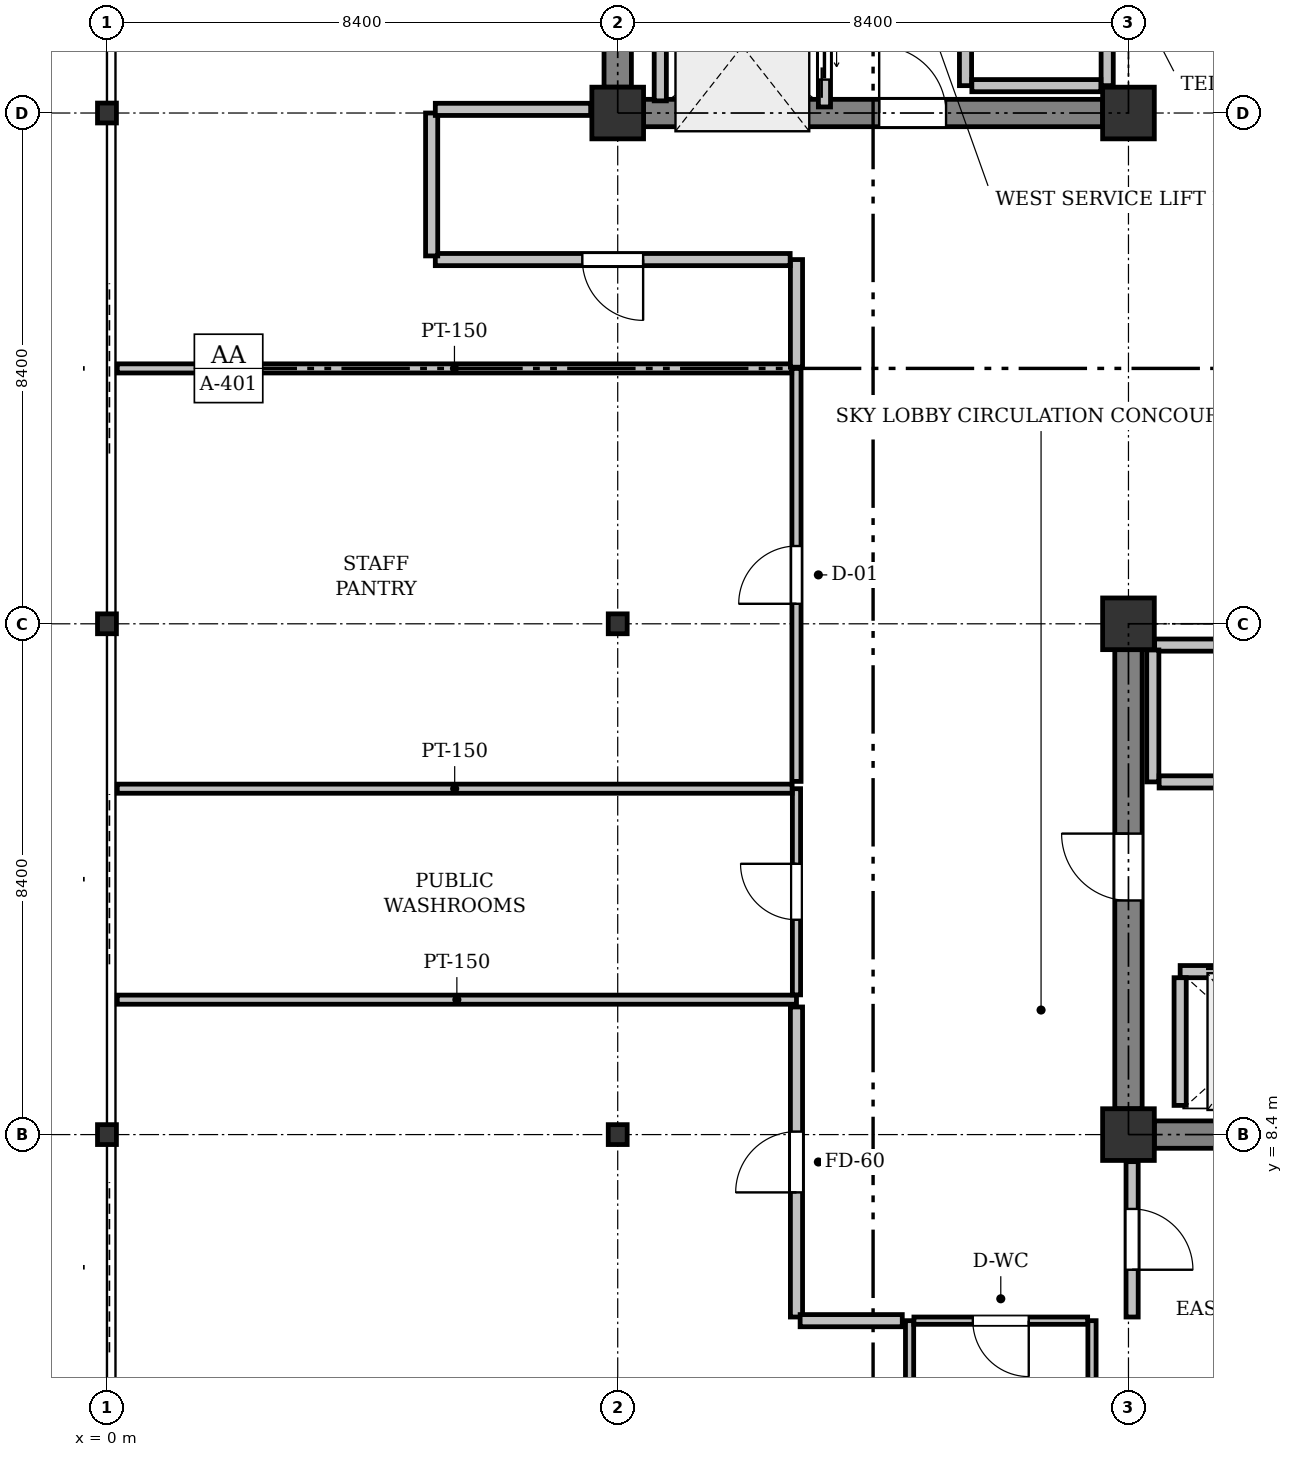
"""IFC4 building model, lengths in metres.
Left out: names, types, materials, properties, quantities, classifications, styles, units other than length and angle.
Written with IfcOpenShell. Run it as: python <this file> out.ifc"""

import sys

from ifc_helpers import new_model, si_unit, direction, frame, frame_2d, origin, origin_2d, place, context, subcontext, project, spatial, rectangle, i_section, extrude, element, fill, save


model = new_model("IFC4")
c1 = context("Model", 3, precision=1e-05, world=origin(), true_north=direction((0.0, 1.0)))
c2 = subcontext(c1, "Body", "Model", "MODEL_VIEW")
j1 = project(units=[si_unit("LENGTHUNIT", "METRE"), si_unit("PLANEANGLEUNIT", "RADIAN")], contexts=[c1])
p1 = place(None, origin())
s1 = spatial("IfcSite", under=j1, at=p1, CompositionType="ELEMENT")
p2 = place(p1, origin())
s2 = spatial("IfcBuilding", under=s1, at=p2, CompositionType="ELEMENT")
p3 = place(p2, frame((0.0, 0.0, 286.2)))
s3 = spatial("IfcBuildingStorey", under=s2, at=p3, CompositionType="ELEMENT", Elevation=286.2)
for number, where, z_axis, x_axis in (
    (1, (0.0, 8.4, 0.0), (0.0, 0.0, 1.0), (1.0, 0.0, 0.0)),
    (2, (0.0, 16.8, 0.0), (0.0, 0.0, 1.0), (1.0, 0.0, 0.0)),
    (3, (0.0, 25.2, 0.0), (0.0, 0.0, 1.0), (1.0, 0.0, 0.0)),
    (4, (8.4, 8.4, 0.0), (0.0, 0.0, 1.0), (1.0, 0.0, 0.0)),
    (5, (8.4, 16.8, 0.0), (0.0, 0.0, 1.0), (1.0, 0.0, 0.0)),
):
    element("IfcColumn", number, at=place(p3, frame(where, z_axis=z_axis, x_axis=x_axis)), inside=s3, PredefinedType="COLUMN", context=c2, shape_type="SweptSolid", body=[
        extrude(i_section(OverallWidth=0.311, OverallDepth=0.327, WebThickness=0.016, FlangeThickness=0.025, FilletRadius=0.017, at=origin_2d()), origin(), (0.0, 0.0, 1.0), 4.0),
    ])
for number, where, z_axis, x_axis in (
    (6, (8.4, 25.2, 0.0), (0.0, 0.0, 1.0), (1.0, 0.0, 0.0)),
    (7, (16.8, 8.4, 0.0), (0.0, 0.0, 1.0), (1.0, 0.0, 0.0)),
    (8, (16.8, 16.8, 0.0), (0.0, 0.0, 1.0), (1.0, 0.0, 0.0)),
    (9, (16.8, 25.2, 0.0), (0.0, 0.0, 1.0), (1.0, 0.0, 0.0)),
):
    element("IfcColumn", number, at=place(p3, frame(where, z_axis=z_axis, x_axis=x_axis)), inside=s3, PredefinedType="COLUMN", context=c2, shape_type="SweptSolid", body=[
        extrude(rectangle(XDim=0.85, YDim=0.85, at=origin_2d()), origin(), (0.0, 0.0, 1.0), 4.0),
    ])
p4 = place(p3, frame((8.4, 25.625, 0.0), z_axis=(0.0, 0.0, 1.0), x_axis=(0.0, 1.0, 0.0)))
e10 = element("IfcWall", 10, at=p4, inside=s3, PredefinedType="SHEAR", context=c2, shape_type="SweptSolid", body=[
    extrude(rectangle(XDim=7.55, YDim=0.45, at=frame_2d((3.775, 0.0))), origin(), (0.0, 0.0, 1.0), 3.725),
])
p5 = place(p3, frame((8.825, 25.2, 0.0), z_axis=(0.0, 0.0, 1.0), x_axis=(1.0, 0.0, 0.0)))
e11 = element("IfcWall", 11, at=p5, inside=s3, PredefinedType="SHEAR", context=c2, shape_type="SweptSolid", body=[
    extrude(rectangle(XDim=7.55, YDim=0.45, at=frame_2d((3.775, 0.0))), origin(), (0.0, 0.0, 1.0), 3.725),
])
p6 = place(p5, frame((3.875, 0.0, 0.0)))
e12 = element("IfcOpeningElement", 12, at=p6, cuts=e11, PredefinedType="OPENING", context=c2, shape_type="SweptSolid", body=[
    extrude(rectangle(XDim=1.1, YDim=2.15, at=frame_2d((0.55, 1.075))), frame((0.0, 0.235, 0.0), z_axis=(0.0, -1.0, 0.0), x_axis=(1.0, 0.0, 0.0)), (0.0, 0.0, 1.0), 0.47),
])
p7 = place(p3, frame((17.225, 8.4, 0.0), z_axis=(0.0, 0.0, 1.0), x_axis=(1.0, 0.0, 0.0)))
e13 = element("IfcWall", 13, at=p7, inside=s3, PredefinedType="SHEAR", context=c2, shape_type="SweptSolid", body=[
    extrude(rectangle(XDim=7.55, YDim=0.45, at=frame_2d((3.775, 0.0))), origin(), (0.0, 0.0, 1.0), 3.725),
])
p8 = place(p3, frame((16.8, 8.825, 0.0), z_axis=(0.0, 0.0, 1.0), x_axis=(0.0, 1.0, 0.0)))
e14 = element("IfcWall", 14, at=p8, inside=s3, PredefinedType="SHEAR", context=c2, shape_type="SweptSolid", body=[
    extrude(rectangle(XDim=7.55, YDim=0.45, at=frame_2d((3.775, 0.0))), origin(), (0.0, 0.0, 1.0), 3.725),
])
p9 = place(p8, frame((3.425, 0.0, 0.0)))
e15 = element("IfcOpeningElement", 15, at=p9, cuts=e14, PredefinedType="OPENING", context=c2, shape_type="SweptSolid", body=[
    extrude(rectangle(XDim=1.1, YDim=2.15, at=frame_2d((0.55, 1.075))), frame((0.0, 0.235, 0.0), z_axis=(0.0, -1.0, 0.0), x_axis=(1.0, 0.0, 0.0)), (0.0, 0.0, 1.0), 0.47),
])
p10 = place(p3, frame((11.8, 25.3, 0.0), z_axis=(0.0, 0.0, 1.0), x_axis=(0.0, 1.0, 0.0)))
e16 = element("IfcWall", 16, at=p10, inside=s3, PredefinedType="PARTITIONING", context=c2, shape_type="SweptSolid", body=[
    extrude(rectangle(XDim=2.0, YDim=0.2, at=frame_2d((1.0, 0.0))), origin(), (0.0, 0.0, 1.0), 3.725),
])
p11 = place(p10, frame((0.45, 0.0, 0.0)))
e17 = element("IfcOpeningElement", 17, at=p11, cuts=e16, PredefinedType="OPENING", context=c2, shape_type="SweptSolid", body=[
    extrude(rectangle(XDim=1.1, YDim=2.2, at=frame_2d((0.55, 1.1))), frame((0.0, 0.11, 0.0), z_axis=(0.0, -1.0, 0.0), x_axis=(1.0, 0.0, 0.0)), (0.0, 0.0, 1.0), 0.22),
])
p12 = place(p3, frame((9.1, 25.4, 0.0), z_axis=(0.0, 0.0, 1.0), x_axis=(0.0, 1.0, 0.0)))
e18 = element("IfcWall", 18, at=p12, inside=s3, PredefinedType="PARTITIONING", context=c2, shape_type="SweptSolid", body=[
    extrude(rectangle(XDim=1.8, YDim=0.2, at=frame_2d((0.9, 0.0))), origin(), (0.0, 0.0, 1.0), 3.725),
])
p13 = place(p3, frame((17.65, 11.08, 0.0), z_axis=(0.0, 0.0, 1.0), x_axis=(1.0, 0.0, 0.0)))
e19 = element("IfcWall", 19, at=p13, inside=s3, PredefinedType="PARTITIONING", context=c2, shape_type="SweptSolid", body=[
    extrude(rectangle(XDim=2.55, YDim=0.2, at=frame_2d((1.275, 0.0))), origin(), (0.0, 0.0, 1.0), 3.725),
])
p14 = place(p13, frame((0.725, 0.0, 0.0)))
e20 = element("IfcOpeningElement", 20, at=p14, cuts=e19, PredefinedType="OPENING", context=c2, shape_type="SweptSolid", body=[
    extrude(rectangle(XDim=1.1, YDim=2.2, at=frame_2d((0.55, 1.1))), frame((0.0, 0.11, 0.0), z_axis=(0.0, -1.0, 0.0), x_axis=(1.0, 0.0, 0.0)), (0.0, 0.0, 1.0), 0.22),
])
p15 = place(p3, frame((17.65, 8.88, 0.0), z_axis=(0.0, 0.0, 1.0), x_axis=(0.0, 1.0, 0.0)))
e21 = element("IfcWall", 21, at=p15, inside=s3, PredefinedType="PARTITIONING", context=c2, shape_type="SweptSolid", body=[
    extrude(rectangle(XDim=2.1, YDim=0.2, at=frame_2d((1.05, 0.0))), origin(), (0.0, 0.0, 1.0), 3.725),
])
p16 = place(p3, frame((16.45, 25.65, 0.0), z_axis=(0.0, 0.0, 1.0), x_axis=(0.0, 1.0, 0.0)))
e22 = element("IfcWall", 22, at=p16, inside=s3, PredefinedType="PARTITIONING", context=c2, shape_type="SweptSolid", body=[
    extrude(rectangle(XDim=7.52, YDim=0.2, at=frame_2d((3.76, 0.0))), origin(), (0.0, 0.0, 1.0), 3.725),
])
p17 = place(p3, frame((14.12, 31.336, 0.0), z_axis=(0.0, 0.0, 1.0), x_axis=(0.0, -1.0, 0.0)))
e23 = element("IfcWall", 23, at=p17, inside=s3, PredefinedType="PARTITIONING", context=c2, shape_type="SweptSolid", body=[
    extrude(rectangle(XDim=5.686, YDim=0.2, at=frame_2d((2.843, 0.0))), origin(), (0.0, 0.0, 1.0), 3.725),
])
p18 = place(p17, frame((2.418, 0.0, 0.0)))
e24 = element("IfcOpeningElement", 24, at=p18, cuts=e23, PredefinedType="OPENING", context=c2, shape_type="SweptSolid", body=[
    extrude(rectangle(XDim=0.85, YDim=2.15, at=frame_2d((0.425, 1.075))), frame((0.0, 0.11, 0.0), z_axis=(0.0, -1.0, 0.0), x_axis=(1.0, 0.0, 0.0)), (0.0, 0.0, 1.0), 0.22),
])
p19 = place(p3, frame((14.224, 25.65, 0.0), z_axis=(0.0, 0.0, 1.0), x_axis=(1.0, 0.0, 0.0)))
e25 = element("IfcWall", 25, at=p19, inside=s3, PredefinedType="PARTITIONING", context=c2, shape_type="SweptSolid", body=[
    extrude(rectangle(XDim=2.122, YDim=0.2, at=frame_2d((1.061, 0.0))), origin(), (0.0, 0.0, 1.0), 3.725),
])
p20 = place(p3, frame((24.77, 16.45, 0.0), z_axis=(0.0, 0.0, 1.0), x_axis=(-1.0, 0.0, 0.0)))
e26 = element("IfcWall", 26, at=p20, inside=s3, PredefinedType="PARTITIONING", context=c2, shape_type="SweptSolid", body=[
    extrude(rectangle(XDim=7.54, YDim=0.2, at=frame_2d((3.77, 0.0))), origin(), (0.0, 0.0, 1.0), 3.725),
])
p21 = place(p3, frame((17.2, 16.37, 0.0), z_axis=(0.0, 0.0, 1.0), x_axis=(0.0, -1.0, 0.0)))
e27 = element("IfcWall", 27, at=p21, inside=s3, PredefinedType="PARTITIONING", context=c2, shape_type="SweptSolid", body=[
    extrude(rectangle(XDim=2.17, YDim=0.2, at=frame_2d((1.085, 0.0))), origin(), (0.0, 0.0, 1.0), 3.725),
])
p22 = place(p3, frame((17.304, 14.2, 0.0), z_axis=(0.0, 0.0, 1.0), x_axis=(1.0, 0.0, 0.0)))
e28 = element("IfcWall", 28, at=p22, inside=s3, PredefinedType="PARTITIONING", context=c2, shape_type="SweptSolid", body=[
    extrude(rectangle(XDim=7.546, YDim=0.2, at=frame_2d((3.773, 0.0))), origin(), (0.0, 0.0, 1.0), 3.725),
])
p23 = place(p22, frame((3.348, 0.0, 0.0)))
e29 = element("IfcOpeningElement", 29, at=p23, cuts=e28, PredefinedType="OPENING", context=c2, shape_type="SweptSolid", body=[
    extrude(rectangle(XDim=0.85, YDim=2.15, at=frame_2d((0.425, 1.075))), frame((0.0, 0.11, 0.0), z_axis=(0.0, -1.0, 0.0), x_axis=(1.0, 0.0, 0.0)), (0.0, 0.0, 1.0), 0.22),
])
for number, where, z_axis, x_axis in (
    (30, (13.2, 5.34, 0.0), (0.0, 0.0, 1.0), (0.0, -1.0, 0.0)),
    (31, (16.2, 0.124, 0.0), (0.0, 0.0, 1.0), (0.0, 1.0, 0.0)),
):
    element("IfcWall", number, at=place(p3, frame(where, z_axis=z_axis, x_axis=x_axis)), inside=s3, PredefinedType="PARTITIONING", context=c2, shape_type="SweptSolid", body=[
        extrude(rectangle(XDim=5.216, YDim=0.135, at=frame_2d((2.608, 0.0))), origin(), (0.0, 0.0, 1.0), 3.725),
    ])
p24 = place(p3, frame((16.128, 5.34, 0.0), z_axis=(0.0, 0.0, 1.0), x_axis=(-1.0, 0.0, 0.0)))
e32 = element("IfcWall", 32, at=p24, inside=s3, PredefinedType="PARTITIONING", context=c2, shape_type="SweptSolid", body=[
    extrude(rectangle(XDim=2.857, YDim=0.12, at=frame_2d((1.428, 0.0))), origin(), (0.0, 0.0, 1.0), 3.725),
])
p25 = place(p24, frame((0.969, 0.0, 0.0)))
e33 = element("IfcOpeningElement", 33, at=p25, cuts=e32, PredefinedType="OPENING", context=c2, shape_type="SweptSolid", body=[
    extrude(rectangle(XDim=0.92, YDim=2.1, at=frame_2d((0.46, 1.05))), frame((0.0, 0.07, 0.0), z_axis=(0.0, -1.0, 0.0), x_axis=(1.0, 0.0, 0.0)), (0.0, 0.0, 1.0), 0.14),
])
p26 = place(p3, frame((0.169, 10.619, 0.0), z_axis=(0.0, 0.0, 1.0), x_axis=(1.0, 0.0, 0.0)))
e34 = element("IfcWall", 34, at=p26, inside=s3, PredefinedType="PARTITIONING", context=c2, shape_type="SweptSolid", body=[
    extrude(rectangle(XDim=11.171, YDim=0.15, at=frame_2d((5.585, 0.0))), origin(), (0.0, 0.0, 1.0), 3.319),
])
p27 = place(p3, frame((11.34, 10.698, 0.0), z_axis=(0.0, 0.0, 1.0), x_axis=(0.0, 1.0, 0.0)))
e35 = element("IfcWall", 35, at=p27, inside=s3, PredefinedType="PARTITIONING", context=c2, shape_type="SweptSolid", body=[
    extrude(rectangle(XDim=3.391, YDim=0.135, at=frame_2d((1.695, 0.0))), origin(), (0.0, 0.0, 1.0), 3.725),
])
p28 = place(p27, frame((1.235, 0.0, 0.0)))
e36 = element("IfcOpeningElement", 36, at=p28, cuts=e35, PredefinedType="OPENING", context=c2, shape_type="SweptSolid", body=[
    extrude(rectangle(XDim=0.92, YDim=2.1, at=frame_2d((0.46, 1.05))), frame((0.0, 0.077, 0.0), z_axis=(0.0, -1.0, 0.0), x_axis=(1.0, 0.0, 0.0)), (0.0, 0.0, 1.0), 0.155),
])
p29 = place(p3, frame((11.269, 14.088, 0.0), z_axis=(0.0, 0.0, 1.0), x_axis=(-1.0, 0.0, 0.0)))
e37 = element("IfcWall", 37, at=p29, inside=s3, PredefinedType="PARTITIONING", context=c2, shape_type="SweptSolid", body=[
    extrude(rectangle(XDim=11.1, YDim=0.15, at=frame_2d((5.55, 0.0))), origin(), (0.0, 0.0, 1.0), 3.319),
])
p30 = place(p3, frame((11.34, 14.208, 0.0), z_axis=(0.0, 0.0, 1.0), x_axis=(0.0, 1.0, 0.0)))
e38 = element("IfcWall", 38, at=p30, inside=s3, PredefinedType="PARTITIONING", context=c2, shape_type="SweptSolid", body=[
    extrude(rectangle(XDim=6.792, YDim=0.15, at=frame_2d((3.396, 0.0))), origin(), (0.0, 0.0, 1.0), 3.271),
])
p31 = place(p30, frame((2.921, 0.0, 0.0)))
e39 = element("IfcOpeningElement", 39, at=p31, cuts=e38, PredefinedType="OPENING", context=c2, shape_type="SweptSolid", body=[
    extrude(rectangle(XDim=0.95, YDim=2.15, at=frame_2d((0.475, 1.075))), frame((0.0, 0.085, 0.0), z_axis=(0.0, -1.0, 0.0), x_axis=(1.0, 0.0, 0.0)), (0.0, 0.0, 1.0), 0.17),
])
p32 = place(p3, frame((11.261, 21.0, 0.0), z_axis=(0.0, 0.0, 1.0), x_axis=(-1.0, 0.0, 0.0)))
e40 = element("IfcWall", 40, at=p32, inside=s3, PredefinedType="PARTITIONING", context=c2, shape_type="SweptSolid", body=[
    extrude(rectangle(XDim=11.092, YDim=0.15, at=frame_2d((5.546, 0.0))), origin(), (0.0, 0.0, 1.0), 3.319),
])
p33 = place(p3, frame((11.34, 5.4, 0.0), z_axis=(0.0, 0.0, 1.0), x_axis=(0.0, 1.0, 0.0)))
e41 = element("IfcWall", 41, at=p33, inside=s3, PredefinedType="PARTITIONING", context=c2, shape_type="SweptSolid", body=[
    extrude(rectangle(XDim=5.099, YDim=0.2, at=frame_2d((2.549, 0.0))), origin(), (0.0, 0.0, 1.0), 3.271),
])
p34 = place(p33, frame((2.049, 0.0, 0.0)))
e42 = element("IfcOpeningElement", 42, at=p34, cuts=e41, PredefinedType="OPENING", context=c2, shape_type="SweptSolid", body=[
    extrude(rectangle(XDim=1.0, YDim=2.15, at=frame_2d((0.5, 1.075))), frame((0.0, 0.11, 0.0), z_axis=(0.0, -1.0, 0.0), x_axis=(1.0, 0.0, 0.0)), (0.0, 0.0, 1.0), 0.22),
])
p35 = place(p3, frame((13.08, 5.34, 0.0), z_axis=(0.0, 0.0, 1.0), x_axis=(-1.0, 0.0, 0.0)))
e43 = element("IfcWall", 43, at=p35, inside=s3, PredefinedType="PARTITIONING", context=c2, shape_type="SweptSolid", body=[
    extrude(rectangle(XDim=1.68, YDim=0.2, at=frame_2d((0.84, 0.0))), origin(), (0.0, 0.0, 1.0), 3.421),
])
p36 = place(p3, frame((16.86, 7.955, 0.0), z_axis=(0.0, 0.0, 1.0), x_axis=(0.0, -1.0, 0.0)))
e44 = element("IfcWall", 44, at=p36, inside=s3, PredefinedType="PARTITIONING", context=c2, shape_type="SweptSolid", body=[
    extrude(rectangle(XDim=2.555, YDim=0.2, at=frame_2d((1.278, 0.0))), origin(), (0.0, 0.0, 1.0), 3.319),
])
p37 = place(p36, frame((0.778, 0.0, 0.0)))
e45 = element("IfcOpeningElement", 45, at=p37, cuts=e44, PredefinedType="OPENING", context=c2, shape_type="SweptSolid", body=[
    extrude(rectangle(XDim=1.0, YDim=2.15, at=frame_2d((0.5, 1.075))), frame((0.0, 0.11, 0.0), z_axis=(0.0, -1.0, 0.0), x_axis=(1.0, 0.0, 0.0)), (0.0, 0.0, 1.0), 0.22),
])
p38 = place(p3, frame((11.34, 21.02, 0.0), z_axis=(0.0, 0.0, 1.0), x_axis=(0.0, 1.0, 0.0)))
e46 = element("IfcWall", 46, at=p38, inside=s3, PredefinedType="PARTITIONING", context=c2, shape_type="SweptSolid", body=[
    extrude(rectangle(XDim=1.77, YDim=0.2, at=frame_2d((0.885, 0.0))), origin(), (0.0, 0.0, 1.0), 3.725),
])
p39 = place(p3, frame((11.236, 22.79, 0.0), z_axis=(0.0, 0.0, 1.0), x_axis=(-1.0, 0.0, 0.0)))
e47 = element("IfcWall", 47, at=p39, inside=s3, PredefinedType="PARTITIONING", context=c2, shape_type="SweptSolid", body=[
    extrude(rectangle(XDim=5.836, YDim=0.2, at=frame_2d((2.918, 0.0))), origin(), (0.0, 0.0, 1.0), 3.319),
])
p40 = place(p39, frame((2.418, 0.0, 0.0)))
e48 = element("IfcOpeningElement", 48, at=p40, cuts=e47, PredefinedType="OPENING", context=c2, shape_type="SweptSolid", body=[
    extrude(rectangle(XDim=1.0, YDim=2.15, at=frame_2d((0.5, 1.075))), frame((0.0, 0.11, 0.0), z_axis=(0.0, -1.0, 0.0), x_axis=(1.0, 0.0, 0.0)), (0.0, 0.0, 1.0), 0.22),
])
p41 = place(p3, frame((5.34, 22.85, 0.0), z_axis=(0.0, 0.0, 1.0), x_axis=(0.0, 1.0, 0.0)))
e49 = element("IfcWall", 49, at=p41, inside=s3, PredefinedType="PARTITIONING", context=c2, shape_type="SweptSolid", body=[
    extrude(rectangle(XDim=2.35, YDim=0.2, at=frame_2d((1.175, 0.0))), origin(), (0.0, 0.0, 1.0), 3.271),
])
p42 = place(p3, frame((5.4, 25.26, 0.0), z_axis=(0.0, 0.0, 1.0), x_axis=(1.0, 0.0, 0.0)))
e50 = element("IfcWall", 50, at=p42, inside=s3, PredefinedType="PARTITIONING", context=c2, shape_type="SweptSolid", body=[
    extrude(rectangle(XDim=2.555, YDim=0.2, at=frame_2d((1.278, 0.0))), origin(), (0.0, 0.0, 1.0), 3.271),
])
p43 = place(p6, origin())
e51 = element("IfcDoor", 51, at=p43, inside=s3, OperationType="SINGLE_SWING_LEFT", PredefinedType="DOOR", context=c2, shape_type="SweptSolid", body=[
    extrude(rectangle(XDim=1.1, YDim=2.15, at=frame_2d((0.55, 1.075))), frame((0.0, 0.025, 0.0), z_axis=(0.0, -1.0, 0.0), x_axis=(1.0, 0.0, 0.0)), (0.0, 0.0, 1.0), 0.05),
])
fill(e12, e51)
p44 = place(p9, origin())
e52 = element("IfcDoor", 52, at=p44, inside=s3, OperationType="SINGLE_SWING_RIGHT", PredefinedType="DOOR", context=c2, shape_type="SweptSolid", body=[
    extrude(rectangle(XDim=1.1, YDim=2.15, at=frame_2d((0.55, 1.075))), frame((0.0, 0.025, 0.0), z_axis=(0.0, -1.0, 0.0), x_axis=(1.0, 0.0, 0.0)), (0.0, 0.0, 1.0), 0.05),
])
fill(e15, e52)
p45 = place(p11, origin())
e53 = element("IfcDoor", 53, at=p45, inside=s3, OperationType="DOUBLE_DOOR_SLIDING", PredefinedType="DOOR", context=c2, shape_type="SweptSolid", body=[
    extrude(rectangle(XDim=1.1, YDim=2.2, at=frame_2d((0.55, 1.1))), frame((0.0, 0.025, 0.0), z_axis=(0.0, -1.0, 0.0), x_axis=(1.0, 0.0, 0.0)), (0.0, 0.0, 1.0), 0.05),
])
fill(e17, e53)
p46 = place(p25, origin())
e54 = element("IfcDoor", 54, at=p46, inside=s3, OperationType="SINGLE_SWING_LEFT", PredefinedType="DOOR", context=c2, shape_type="SweptSolid", body=[
    extrude(rectangle(XDim=0.92, YDim=2.1, at=frame_2d((0.46, 1.05))), frame((0.0, 0.025, 0.0), z_axis=(0.0, -1.0, 0.0), x_axis=(1.0, 0.0, 0.0)), (0.0, 0.0, 1.0), 0.05),
])
fill(e33, e54)
p47 = place(p28, origin())
e55 = element("IfcDoor", 55, at=p47, inside=s3, OperationType="SINGLE_SWING_RIGHT", PredefinedType="DOOR", context=c2, shape_type="SweptSolid", body=[
    extrude(rectangle(XDim=0.92, YDim=2.1, at=frame_2d((0.46, 1.05))), frame((0.0, 0.025, 0.0), z_axis=(0.0, -1.0, 0.0), x_axis=(1.0, 0.0, 0.0)), (0.0, 0.0, 1.0), 0.05),
])
fill(e36, e55)
p48 = place(p31, origin())
e56 = element("IfcDoor", 56, at=p48, inside=s3, OperationType="SINGLE_SWING_LEFT", PredefinedType="DOOR", context=c2, shape_type="SweptSolid", body=[
    extrude(rectangle(XDim=0.95, YDim=2.15, at=frame_2d((0.475, 1.075))), frame((0.0, 0.025, 0.0), z_axis=(0.0, -1.0, 0.0), x_axis=(1.0, 0.0, 0.0)), (0.0, 0.0, 1.0), 0.05),
])
fill(e39, e56)
p49 = place(p34, origin())
e57 = element("IfcDoor", 57, at=p49, inside=s3, OperationType="SINGLE_SWING_LEFT", PredefinedType="DOOR", context=c2, shape_type="SweptSolid", body=[
    extrude(rectangle(XDim=1.0, YDim=2.15, at=frame_2d((0.5, 1.075))), frame((0.0, 0.025, 0.0), z_axis=(0.0, -1.0, 0.0), x_axis=(1.0, 0.0, 0.0)), (0.0, 0.0, 1.0), 0.05),
])
fill(e42, e57)
p50 = place(p37, origin())
e58 = element("IfcDoor", 58, at=p50, inside=s3, OperationType="SINGLE_SWING_RIGHT", PredefinedType="DOOR", context=c2, shape_type="SweptSolid", body=[
    extrude(rectangle(XDim=1.0, YDim=2.15, at=frame_2d((0.5, 1.075))), frame((0.0, 0.025, 0.0), z_axis=(0.0, -1.0, 0.0), x_axis=(1.0, 0.0, 0.0)), (0.0, 0.0, 1.0), 0.05),
])
fill(e45, e58)
p51 = place(p40, origin())
e59 = element("IfcDoor", 59, at=p51, inside=s3, OperationType="SINGLE_SWING_LEFT", PredefinedType="DOOR", context=c2, shape_type="SweptSolid", body=[
    extrude(rectangle(XDim=1.0, YDim=2.15, at=frame_2d((0.5, 1.075))), frame((0.0, 0.025, 0.0), z_axis=(0.0, -1.0, 0.0), x_axis=(1.0, 0.0, 0.0)), (0.0, 0.0, 1.0), 0.05),
])
fill(e48, e59)
save(model, sys.argv[1])
